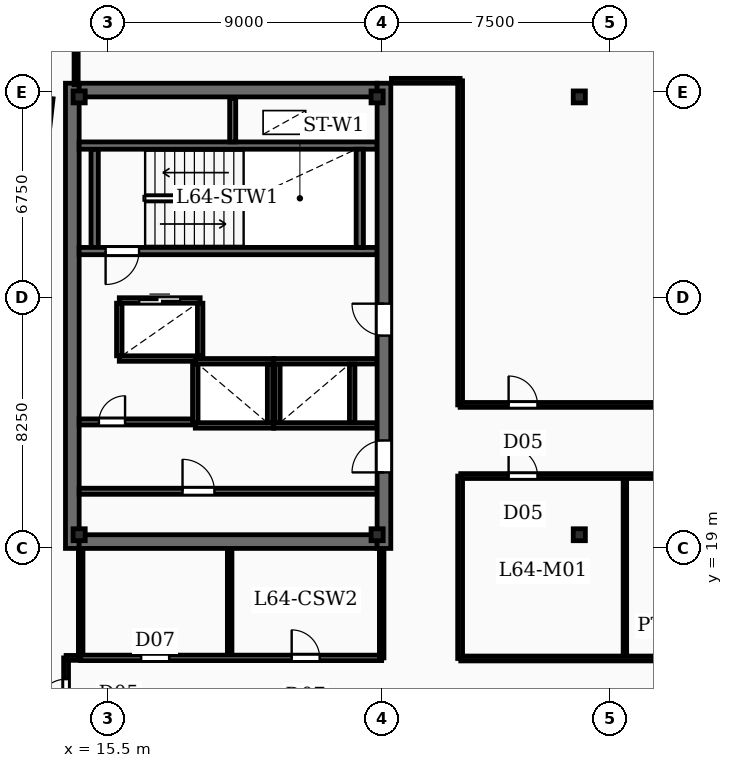
"""IFC4 building model, lengths in metres.
Left out: names, types, materials, properties, quantities, classifications, styles, units other than length and angle.
Written with IfcOpenShell. Run it as: python <this file> out.ifc"""

import sys

from ifc_helpers import new_model, si_unit, direction, frame, frame_2d, origin, origin_2d, place, context, subcontext, project, spatial, rectangle, i_section, extrude, element, fill, save


model = new_model("IFC4")
c1 = context("Model", 3, precision=1e-05, world=origin(), true_north=direction((0.0, 1.0)))
c2 = subcontext(c1, "Body", "Model", "MODEL_VIEW")
j1 = project(units=[si_unit("LENGTHUNIT", "METRE"), si_unit("PLANEANGLEUNIT", "RADIAN")], contexts=[c1])
p1 = place(None, origin())
s1 = spatial("IfcSite", under=j1, at=p1, CompositionType="ELEMENT")
p2 = place(p1, origin())
s2 = spatial("IfcBuilding", under=s1, at=p2, CompositionType="ELEMENT")
p3 = place(p2, frame((0.0, 0.0, 262.2)))
s3 = spatial("IfcBuildingStorey", under=s2, at=p3, CompositionType="ELEMENT", Elevation=262.2)
p4 = place(p3, frame((14.325, 19.0, -0.27), z_axis=(0.0, 0.0, 1.0), x_axis=(0.0, 1.0, 0.0)))
e1 = element("IfcWall", 1, at=p4, inside=s3, PredefinedType="SHEAR", context=c2, shape_type="SweptSolid", body=[
    extrude(rectangle(XDim=15.3, YDim=0.45, at=frame_2d((7.65, 0.0))), origin(), (0.0, 0.0, 1.0), 3.75),
])
p5 = place(p3, frame((24.575, 19.0, -0.27), z_axis=(0.0, 0.0, 1.0), x_axis=(0.0, 1.0, 0.0)))
e2 = element("IfcWall", 2, at=p5, inside=s3, PredefinedType="SHEAR", context=c2, shape_type="SweptSolid", body=[
    extrude(rectangle(XDim=15.3, YDim=0.45, at=frame_2d((7.65, 0.0))), origin(), (0.0, 0.0, 1.0), 3.75),
])
p6 = place(p5, frame((2.5, 0.0, 0.27)))
e3 = element("IfcOpeningElement", 3, at=p6, cuts=e2, PredefinedType="OPENING", context=c2, shape_type="SweptSolid", body=[
    extrude(rectangle(XDim=1.05, YDim=2.15, at=frame_2d((0.525, 1.075))), frame((0.0, 0.235, 0.0), z_axis=(0.0, -1.0, 0.0), x_axis=(1.0, 0.0, 0.0)), (0.0, 0.0, 1.0), 0.47),
])
p7 = place(p5, frame((7.0, 0.0, 0.27)))
e4 = element("IfcOpeningElement", 4, at=p7, cuts=e2, PredefinedType="OPENING", context=c2, shape_type="SweptSolid", body=[
    extrude(rectangle(XDim=1.05, YDim=2.15, at=frame_2d((0.525, 1.075))), frame((0.0, 0.235, 0.0), z_axis=(0.0, -1.0, 0.0), x_axis=(1.0, 0.0, 0.0)), (0.0, 0.0, 1.0), 0.47),
])
for number, where, z_axis, x_axis in (
    (5, (14.55, 19.225, -0.27), (0.0, 0.0, 1.0), (1.0, 0.0, 0.0)),
    (6, (14.55, 34.075, -0.27), (0.0, 0.0, 1.0), (1.0, 0.0, 0.0)),
):
    element("IfcWall", number, at=place(p3, frame(where, z_axis=z_axis, x_axis=x_axis)), inside=s3, PredefinedType="SHEAR", context=c2, shape_type="SweptSolid", body=[
        extrude(rectangle(XDim=9.8, YDim=0.45, at=frame_2d((4.9, 0.0))), origin(), (0.0, 0.0, 1.0), 3.75),
    ])
for number, where, z_axis, x_axis in (
    (7, (14.55, 19.45, -0.27), (0.0, 0.0, 1.0), (1.0, 0.0, 0.0)),
    (8, (24.35, 19.45, -0.27), (0.0, 0.0, 1.0), (1.0, 0.0, 0.0)),
    (9, (14.55, 33.85, -0.27), (0.0, 0.0, 1.0), (1.0, 0.0, 0.0)),
    (10, (24.35, 33.85, -0.27), (0.0, 0.0, 1.0), (1.0, 0.0, 0.0)),
    (11, (31.0, 19.45, -0.27), (0.0, 0.0, 1.0), (1.0, 0.0, 0.0)),
    (12, (31.0, 33.85, -0.27), (0.0, 0.0, 1.0), (1.0, 0.0, 0.0)),
):
    element("IfcColumn", number, at=place(p3, frame(where, z_axis=z_axis, x_axis=x_axis)), inside=s3, PredefinedType="COLUMN", context=c2, shape_type="SweptSolid", body=[
        extrude(i_section(OverallWidth=0.399, OverallDepth=0.393, WebThickness=0.023, FlangeThickness=0.037, FilletRadius=0.02, at=origin_2d()), origin(), (0.0, 0.0, 1.0), 3.75),
    ])
p8 = place(p3, frame((13.269, 33.384, -0.27), z_axis=(0.0, 0.0, 1.0), x_axis=(0.113203213768, 0.993571855677, 0.0)))
e13 = element("IfcColumn", 13, at=p8, inside=s3, PredefinedType="COLUMN", context=c2, shape_type="SweptSolid", body=[
    extrude(rectangle(XDim=0.9, YDim=0.75, at=origin_2d()), origin(), (0.0, 0.0, 1.0), 3.75),
])
p9 = place(p3, frame((10.211, 10.701, 0.0), z_axis=(0.0, 0.0, 1.0), x_axis=(0.113203107947, 0.993571867733, 0.0)))
e14 = element("IfcWall", 14, at=p9, inside=s3, PredefinedType="SOLIDWALL", context=c2, shape_type="SweptSolid", body=[
    extrude(rectangle(XDim=34.5, YDim=0.36, at=frame_2d((17.25, 0.0))), origin(), (0.0, 0.0, 1.0), 3.48),
])
p10 = place(p9, frame((4.2, 0.0, 0.88)))
e15 = element("IfcOpeningElement", 15, at=p10, cuts=e14, PredefinedType="OPENING", context=c2, shape_type="SweptSolid", body=[
    extrude(rectangle(XDim=1.35, YDim=2.2, at=frame_2d((0.675, 1.1))), frame((0.0, 0.19, 0.0), z_axis=(0.0, -1.0, 0.0), x_axis=(1.0, 0.0, 0.0)), (0.0, 0.0, 1.0), 0.38),
])
p11 = place(p9, frame((15.4, 0.0, 0.88)))
e16 = element("IfcOpeningElement", 16, at=p11, cuts=e14, PredefinedType="OPENING", context=c2, shape_type="SweptSolid", body=[
    extrude(rectangle(XDim=1.35, YDim=2.2, at=frame_2d((0.675, 1.1))), frame((0.0, 0.19, 0.0), z_axis=(0.0, -1.0, 0.0), x_axis=(1.0, 0.0, 0.0)), (0.0, 0.0, 1.0), 0.38),
])
p12 = place(p9, frame((26.6, 0.0, 0.88)))
e17 = element("IfcOpeningElement", 17, at=p12, cuts=e14, PredefinedType="OPENING", context=c2, shape_type="SweptSolid", body=[
    extrude(rectangle(XDim=1.35, YDim=2.2, at=frame_2d((0.675, 1.1))), frame((0.0, 0.19, 0.0), z_axis=(0.0, -1.0, 0.0), x_axis=(1.0, 0.0, 0.0)), (0.0, 0.0, 1.0), 0.38),
])
p13 = place(p3, frame((24.35, 28.78, 0.0), z_axis=(0.0, 0.0, 1.0), x_axis=(-1.0, 0.0, 0.0)))
e18 = element("IfcWall", 18, at=p13, inside=s3, PredefinedType="SOLIDWALL", context=c2, shape_type="SweptSolid", body=[
    extrude(rectangle(XDim=9.8, YDim=0.24, at=frame_2d((4.9, 0.0))), origin(), (0.0, 0.0, 1.0), 3.48),
])
p14 = place(p13, frame((7.83, 0.0, 0.0)))
e19 = element("IfcOpeningElement", 19, at=p14, cuts=e18, PredefinedType="OPENING", context=c2, shape_type="SweptSolid", body=[
    extrude(rectangle(XDim=1.1, YDim=2.15, at=frame_2d((0.55, 1.075))), frame((0.0, 0.13, 0.0), z_axis=(0.0, -1.0, 0.0), x_axis=(1.0, 0.0, 0.0)), (0.0, 0.0, 1.0), 0.26),
])
p15 = place(p3, frame((14.55, 32.25, 0.0), z_axis=(0.0, 0.0, 1.0), x_axis=(1.0, 0.0, 0.0)))
e20 = element("IfcWall", 20, at=p15, inside=s3, PredefinedType="SOLIDWALL", context=c2, shape_type="SweptSolid", body=[
    extrude(rectangle(XDim=9.8, YDim=0.24, at=frame_2d((4.9, 0.0))), origin(), (0.0, 0.0, 1.0), 3.48),
])
for number, where, z_axis, x_axis in (
    (21, (15.06, 28.9, 0.0), (0.0, 0.0, 1.0), (0.0, 1.0, 0.0)),
    (22, (23.78, 28.9, 0.0), (0.0, 0.0, 1.0), (0.0, 1.0, 0.0)),
):
    element("IfcWall", number, at=place(p3, frame(where, z_axis=z_axis, x_axis=x_axis)), inside=s3, PredefinedType="SOLIDWALL", context=c2, shape_type="SweptSolid", body=[
        extrude(rectangle(XDim=3.23, YDim=0.24, at=frame_2d((1.615, 0.0))), origin(), (0.0, 0.0, 1.0), 3.48),
    ])
p16 = place(p3, frame((19.6, 32.37, 0.0), z_axis=(0.0, 0.0, 1.0), x_axis=(0.0, 1.0, 0.0)))
e23 = element("IfcWall", 23, at=p16, inside=s3, PredefinedType="SOLIDWALL", context=c2, shape_type="SweptSolid", body=[
    extrude(rectangle(XDim=1.43, YDim=0.2, at=frame_2d((0.715, 0.0))), origin(), (0.0, 0.0, 1.0), 3.48),
])
for number, where, z_axis, x_axis in (
    (24, (18.37, 25.155, 0.0), (0.0, 0.0, 1.0), (1.0, 0.0, 0.0)),
    (25, (18.37, 23.045, 0.0), (0.0, 0.0, 1.0), (1.0, 0.0, 0.0)),
):
    element("IfcWall", number, at=place(p3, frame(where, z_axis=z_axis, x_axis=x_axis)), inside=s3, PredefinedType="SOLIDWALL", context=c2, shape_type="SweptSolid", body=[
        extrude(rectangle(XDim=2.58, YDim=0.18, at=frame_2d((1.29, 0.0))), origin(), (0.0, 0.0, 1.0), 3.48),
    ])
for number, where, z_axis, x_axis in (
    (26, (18.37, 23.135, 0.0), (0.0, 0.0, 1.0), (0.0, 1.0, 0.0)),
    (27, (20.83, 23.135, 0.0), (0.0, 0.0, 1.0), (0.0, 1.0, 0.0)),
):
    element("IfcWall", number, at=place(p3, frame(where, z_axis=z_axis, x_axis=x_axis)), inside=s3, PredefinedType="SOLIDWALL", context=c2, shape_type="SweptSolid", body=[
        extrude(rectangle(XDim=1.93, YDim=0.18, at=frame_2d((0.965, 0.0))), origin(), (0.0, 0.0, 1.0), 3.48),
    ])
for number, where, z_axis, x_axis in (
    (28, (20.95, 25.155, 0.0), (0.0, 0.0, 1.0), (1.0, 0.0, 0.0)),
    (29, (20.95, 23.045, 0.0), (0.0, 0.0, 1.0), (1.0, 0.0, 0.0)),
):
    element("IfcWall", number, at=place(p3, frame(where, z_axis=z_axis, x_axis=x_axis)), inside=s3, PredefinedType="SOLIDWALL", context=c2, shape_type="SweptSolid", body=[
        extrude(rectangle(XDim=3.4, YDim=0.18, at=frame_2d((1.7, 0.0))), origin(), (0.0, 0.0, 1.0), 3.48),
    ])
for number, where, z_axis, x_axis in (
    (30, (21.07, 23.135, 0.0), (0.0, 0.0, 1.0), (0.0, 1.0, 0.0)),
    (31, (23.53, 23.135, 0.0), (0.0, 0.0, 1.0), (0.0, 1.0, 0.0)),
):
    element("IfcWall", number, at=place(p3, frame(where, z_axis=z_axis, x_axis=x_axis)), inside=s3, PredefinedType="SOLIDWALL", context=c2, shape_type="SweptSolid", body=[
        extrude(rectangle(XDim=1.93, YDim=0.18, at=frame_2d((0.965, 0.0))), origin(), (0.0, 0.0, 1.0), 3.48),
    ])
p17 = place(p3, frame((15.87, 27.155, 0.0), z_axis=(0.0, 0.0, 1.0), x_axis=(1.0, 0.0, 0.0)))
e32 = element("IfcWall", 32, at=p17, inside=s3, PredefinedType="SOLIDWALL", context=c2, shape_type="SweptSolid", body=[
    extrude(rectangle(XDim=2.66, YDim=0.18, at=frame_2d((1.33, 0.0))), origin(), (0.0, 0.0, 1.0), 3.48),
])
p18 = place(p17, frame((0.655, 0.0, 0.0)))
e33 = element("IfcOpeningElement", 33, at=p18, cuts=e32, PredefinedType="OPENING", context=c2, shape_type="SweptSolid", body=[
    extrude(rectangle(XDim=1.35, YDim=2.3, at=frame_2d((0.675, 1.15))), frame((0.0, 0.1, 0.0), z_axis=(0.0, -1.0, 0.0), x_axis=(1.0, 0.0, 0.0)), (0.0, 0.0, 1.0), 0.2),
])
p19 = place(p3, frame((15.87, 25.245, 0.0), z_axis=(0.0, 0.0, 1.0), x_axis=(1.0, 0.0, 0.0)))
e34 = element("IfcWall", 34, at=p19, inside=s3, PredefinedType="SOLIDWALL", context=c2, shape_type="SweptSolid", body=[
    extrude(rectangle(XDim=2.66, YDim=0.18, at=frame_2d((1.33, 0.0))), origin(), (0.0, 0.0, 1.0), 3.48),
])
for number, where, z_axis, x_axis in (
    (35, (15.87, 25.335, 0.0), (0.0, 0.0, 1.0), (0.0, 1.0, 0.0)),
    (36, (18.53, 25.335, 0.0), (0.0, 0.0, 1.0), (0.0, 1.0, 0.0)),
):
    element("IfcWall", number, at=place(p3, frame(where, z_axis=z_axis, x_axis=x_axis)), inside=s3, PredefinedType="SOLIDWALL", context=c2, shape_type="SweptSolid", body=[
        extrude(rectangle(XDim=1.73, YDim=0.18, at=frame_2d((0.865, 0.0))), origin(), (0.0, 0.0, 1.0), 3.48),
    ])
p20 = place(p3, frame((14.55, 20.88, 0.0), z_axis=(0.0, 0.0, 1.0), x_axis=(1.0, 0.0, 0.0)))
e37 = element("IfcWall", 37, at=p20, inside=s3, PredefinedType="SOLIDWALL", context=c2, shape_type="SweptSolid", body=[
    extrude(rectangle(XDim=9.8, YDim=0.2, at=frame_2d((4.9, 0.0))), origin(), (0.0, 0.0, 1.0), 2.54),
])
p21 = place(p20, frame((3.4, 0.0, 0.0)))
e38 = element("IfcOpeningElement", 38, at=p21, cuts=e37, PredefinedType="OPENING", context=c2, shape_type="SweptSolid", body=[
    extrude(rectangle(XDim=1.05, YDim=2.15, at=frame_2d((0.525, 1.075))), frame((0.0, 0.11, 0.0), z_axis=(0.0, -1.0, 0.0), x_axis=(1.0, 0.0, 0.0)), (0.0, 0.0, 1.0), 0.22),
])
p22 = place(p3, frame((14.55, 23.16, 0.0), z_axis=(0.0, 0.0, 1.0), x_axis=(1.0, 0.0, 0.0)))
e39 = element("IfcWall", 39, at=p22, inside=s3, PredefinedType="SOLIDWALL", context=c2, shape_type="SweptSolid", body=[
    extrude(rectangle(XDim=3.82, YDim=0.2, at=frame_2d((1.91, 0.0))), origin(), (0.0, 0.0, 1.0), 2.54),
])
p23 = place(p22, frame((0.65, 0.0, 0.0)))
e40 = element("IfcOpeningElement", 40, at=p23, cuts=e39, PredefinedType="OPENING", context=c2, shape_type="SweptSolid", body=[
    extrude(rectangle(XDim=0.86, YDim=2.05, at=frame_2d((0.43, 1.025))), frame((0.0, 0.11, 0.0), z_axis=(0.0, -1.0, 0.0), x_axis=(1.0, 0.0, 0.0)), (0.0, 0.0, 1.0), 0.22),
])
p24 = place(p3, frame((19.5, 15.4, 0.0), z_axis=(0.0, 0.0, 1.0), x_axis=(0.0, 1.0, 0.0)))
e41 = element("IfcWall", 41, at=p24, inside=s3, PredefinedType="PARTITIONING", context=c2, shape_type="SweptSolid", body=[
    extrude(rectangle(XDim=3.58, YDim=0.15, at=frame_2d((1.79, 0.0))), origin(), (0.0, 0.0, 1.0), 2.54),
])
p25 = place(p3, frame((14.6, 15.4, 0.0), z_axis=(0.0, 0.0, 1.0), x_axis=(1.0, 0.0, 0.0)))
e42 = element("IfcWall", 42, at=p25, inside=s3, PredefinedType="PARTITIONING", context=c2, shape_type="SweptSolid", body=[
    extrude(rectangle(XDim=9.9, YDim=0.18, at=frame_2d((4.95, 0.0))), origin(), (0.0, 0.0, 1.0), 2.54),
])
p26 = place(p25, frame((1.99, 0.0, 0.0)))
e43 = element("IfcOpeningElement", 43, at=p26, cuts=e42, PredefinedType="OPENING", context=c2, shape_type="SweptSolid", body=[
    extrude(rectangle(XDim=0.92, YDim=2.1, at=frame_2d((0.46, 1.05))), frame((0.0, 0.1, 0.0), z_axis=(0.0, -1.0, 0.0), x_axis=(1.0, 0.0, 0.0)), (0.0, 0.0, 1.0), 0.2),
])
p27 = place(p25, frame((6.94, 0.0, 0.0)))
e44 = element("IfcOpeningElement", 44, at=p27, cuts=e42, PredefinedType="OPENING", context=c2, shape_type="SweptSolid", body=[
    extrude(rectangle(XDim=0.92, YDim=2.1, at=frame_2d((0.46, 1.05))), frame((0.0, 0.1, 0.0), z_axis=(0.0, -1.0, 0.0), x_axis=(1.0, 0.0, 0.0)), (0.0, 0.0, 1.0), 0.2),
])
for number, where, z_axis, x_axis in (
    (45, (14.6, 15.4, 0.0), (0.0, 0.0, 1.0), (0.0, 1.0, 0.0)),
    (46, (24.5, 15.4, 0.0), (0.0, 0.0, 1.0), (0.0, 1.0, 0.0)),
):
    element("IfcWall", number, at=place(p3, frame(where, z_axis=z_axis, x_axis=x_axis)), inside=s3, PredefinedType="PARTITIONING", context=c2, shape_type="SweptSolid", body=[
        extrude(rectangle(XDim=3.58, YDim=0.15, at=frame_2d((1.79, 0.0))), origin(), (0.0, 0.0, 1.0), 2.54),
    ])
p28 = place(p3, frame((14.45, 34.25, 0.0), z_axis=(0.0, 0.0, 1.0), x_axis=(0.0, 1.0, 0.0)))
e47 = element("IfcWall", 47, at=p28, inside=s3, PredefinedType="PARTITIONING", context=c2, shape_type="SweptSolid", body=[
    extrude(rectangle(XDim=11.562, YDim=0.135, at=frame_2d((5.781, 0.0))), origin(), (0.0, 0.0, 1.0), 2.54),
])
p29 = place(p3, frame((27.08, 23.72, 0.0), z_axis=(0.0, 0.0, 1.0), x_axis=(1.0, 0.0, 0.0)))
e48 = element("IfcWall", 48, at=p29, inside=s3, PredefinedType="PARTITIONING", context=c2, shape_type="SweptSolid", body=[
    extrude(rectangle(XDim=20.74, YDim=0.16, at=frame_2d((10.37, 0.0))), origin(), (0.0, 0.0, 1.0), 2.54),
])
p30 = place(p29, frame((1.595, 0.0, 0.0)))
e49 = element("IfcOpeningElement", 49, at=p30, cuts=e48, PredefinedType="OPENING", context=c2, shape_type="SweptSolid", body=[
    extrude(rectangle(XDim=0.95, YDim=2.15, at=frame_2d((0.475, 1.075))), frame((0.0, 0.09, 0.0), z_axis=(0.0, -1.0, 0.0), x_axis=(1.0, 0.0, 0.0)), (0.0, 0.0, 1.0), 0.18),
])
p31 = place(p29, frame((14.595, 0.0, 0.0)))
e50 = element("IfcOpeningElement", 50, at=p31, cuts=e48, PredefinedType="OPENING", context=c2, shape_type="SweptSolid", body=[
    extrude(rectangle(XDim=0.95, YDim=2.15, at=frame_2d((0.475, 1.075))), frame((0.0, 0.09, 0.0), z_axis=(0.0, -1.0, 0.0), x_axis=(1.0, 0.0, 0.0)), (0.0, 0.0, 1.0), 0.18),
])
p32 = place(p3, frame((27.08, 23.72, 0.0), z_axis=(0.0, 0.0, 1.0), x_axis=(0.0, 1.0, 0.0)))
e51 = element("IfcWall", 51, at=p32, inside=s3, PredefinedType="PARTITIONING", context=c2, shape_type="SweptSolid", body=[
    extrude(rectangle(XDim=10.66, YDim=0.16, at=frame_2d((5.33, 0.0))), origin(), (0.0, 0.0, 1.0), 2.54),
])
p33 = place(p3, frame((24.82, 34.38, 0.0), z_axis=(0.0, 0.0, 1.0), x_axis=(1.0, 0.0, 0.0)))
e52 = element("IfcWall", 52, at=p33, inside=s3, PredefinedType="PARTITIONING", context=c2, shape_type="SweptSolid", body=[
    extrude(rectangle(XDim=2.26, YDim=0.16, at=frame_2d((1.13, 0.0))), origin(), (0.0, 0.0, 1.0), 2.54),
])
p34 = place(p3, frame((32.5, 15.38, 0.0), z_axis=(0.0, 0.0, 1.0), x_axis=(0.0, 1.0, 0.0)))
e53 = element("IfcWall", 53, at=p34, inside=s3, PredefinedType="PARTITIONING", context=c2, shape_type="SweptSolid", body=[
    extrude(rectangle(XDim=6.0, YDim=0.115, at=frame_2d((3.0, 0.0))), origin(), (0.0, 0.0, 1.0), 2.54),
])
p35 = place(p3, frame((27.1, 21.38, 0.0), z_axis=(0.0, 0.0, 1.0), x_axis=(1.0, 0.0, 0.0)))
e54 = element("IfcWall", 54, at=p35, inside=s3, PredefinedType="PARTITIONING", context=c2, shape_type="SweptSolid", body=[
    extrude(rectangle(XDim=12.46, YDim=0.16, at=frame_2d((6.23, 0.0))), origin(), (0.0, 0.0, 1.0), 2.54),
])
p36 = place(p35, frame((1.575, 0.0, 0.0)))
e55 = element("IfcOpeningElement", 55, at=p36, cuts=e54, PredefinedType="OPENING", context=c2, shape_type="SweptSolid", body=[
    extrude(rectangle(XDim=0.95, YDim=2.15, at=frame_2d((0.475, 1.075))), frame((0.0, 0.09, 0.0), z_axis=(0.0, -1.0, 0.0), x_axis=(1.0, 0.0, 0.0)), (0.0, 0.0, 1.0), 0.18),
])
p37 = place(p35, frame((8.455, 0.0, 0.0)))
e56 = element("IfcOpeningElement", 56, at=p37, cuts=e54, PredefinedType="OPENING", context=c2, shape_type="SweptSolid", body=[
    extrude(rectangle(XDim=0.95, YDim=2.15, at=frame_2d((0.475, 1.075))), frame((0.0, 0.09, 0.0), z_axis=(0.0, -1.0, 0.0), x_axis=(1.0, 0.0, 0.0)), (0.0, 0.0, 1.0), 0.18),
])
p38 = place(p3, frame((27.1, 15.38, 0.0), z_axis=(0.0, 0.0, 1.0), x_axis=(1.0, 0.0, 0.0)))
e57 = element("IfcWall", 57, at=p38, inside=s3, PredefinedType="PARTITIONING", context=c2, shape_type="SweptSolid", body=[
    extrude(rectangle(XDim=12.46, YDim=0.16, at=frame_2d((6.23, 0.0))), origin(), (0.0, 0.0, 1.0), 2.54),
])
p39 = place(p3, frame((27.08, 15.38, 0.0), z_axis=(0.0, 0.0, 1.0), x_axis=(0.0, 1.0, 0.0)))
e58 = element("IfcWall", 58, at=p39, inside=s3, PredefinedType="PARTITIONING", context=c2, shape_type="SweptSolid", body=[
    extrude(rectangle(XDim=6.0, YDim=0.16, at=frame_2d((3.0, 0.0))), origin(), (0.0, 0.0, 1.0), 2.54),
])
p40 = place(p3, frame((14.12, 13.1, 0.0), z_axis=(0.0, 0.0, 1.0), x_axis=(0.0, 1.0, 0.0)))
e59 = element("IfcWall", 59, at=p40, inside=s3, PredefinedType="PARTITIONING", context=c2, shape_type="SweptSolid", body=[
    extrude(rectangle(XDim=2.3, YDim=0.16, at=frame_2d((1.15, 0.0))), origin(), (0.0, 0.0, 1.0), 2.54),
])
p41 = place(p40, frame((0.65, 0.0, 0.0)))
e60 = element("IfcOpeningElement", 60, at=p41, cuts=e59, PredefinedType="OPENING", context=c2, shape_type="SweptSolid", body=[
    extrude(rectangle(XDim=0.95, YDim=2.15, at=frame_2d((0.475, 1.075))), frame((0.0, 0.09, 0.0), z_axis=(0.0, -1.0, 0.0), x_axis=(1.0, 0.0, 0.0)), (0.0, 0.0, 1.0), 0.18),
])
p42 = place(p3, frame((14.12, 15.4, 0.0), z_axis=(0.0, 0.0, 1.0), x_axis=(1.0, 0.0, 0.0)))
e61 = element("IfcWall", 61, at=p42, inside=s3, PredefinedType="PARTITIONING", context=c2, shape_type="SweptSolid", body=[
    extrude(rectangle(XDim=0.5, YDim=0.16, at=frame_2d((0.25, 0.0))), origin(), (0.0, 0.0, 1.0), 2.54),
])
p43 = place(p6, origin())
e62 = element("IfcDoor", 62, at=p43, inside=s3, OperationType="SINGLE_SWING_LEFT", PredefinedType="DOOR", context=c2, shape_type="SweptSolid", body=[
    extrude(rectangle(XDim=1.05, YDim=2.15, at=frame_2d((0.525, 1.075))), frame((0.0, 0.025, 0.0), z_axis=(0.0, -1.0, 0.0), x_axis=(1.0, 0.0, 0.0)), (0.0, 0.0, 1.0), 0.05),
])
fill(e3, e62)
p44 = place(p7, origin())
e63 = element("IfcDoor", 63, at=p44, inside=s3, OperationType="SINGLE_SWING_RIGHT", PredefinedType="DOOR", context=c2, shape_type="SweptSolid", body=[
    extrude(rectangle(XDim=1.05, YDim=2.15, at=frame_2d((0.525, 1.075))), frame((0.0, 0.025, 0.0), z_axis=(0.0, -1.0, 0.0), x_axis=(1.0, 0.0, 0.0)), (0.0, 0.0, 1.0), 0.05),
])
fill(e4, e63)
p45 = place(p14, origin())
e64 = element("IfcDoor", 64, at=p45, inside=s3, OperationType="SINGLE_SWING_RIGHT", PredefinedType="DOOR", context=c2, shape_type="SweptSolid", body=[
    extrude(rectangle(XDim=1.1, YDim=2.15, at=frame_2d((0.55, 1.075))), frame((0.0, 0.025, 0.0), z_axis=(0.0, -1.0, 0.0), x_axis=(1.0, 0.0, 0.0)), (0.0, 0.0, 1.0), 0.05),
])
fill(e19, e64)
p46 = place(p18, origin())
e65 = element("IfcDoor", 65, at=p46, inside=s3, OperationType="DOUBLE_DOOR_SLIDING", PredefinedType="DOOR", context=c2, shape_type="SweptSolid", body=[
    extrude(rectangle(XDim=1.35, YDim=2.3, at=frame_2d((0.675, 1.15))), frame((0.0, 0.025, 0.0), z_axis=(0.0, -1.0, 0.0), x_axis=(1.0, 0.0, 0.0)), (0.0, 0.0, 1.0), 0.05),
])
fill(e33, e65)
p47 = place(p21, origin())
e66 = element("IfcDoor", 66, at=p47, inside=s3, OperationType="SINGLE_SWING_LEFT", PredefinedType="DOOR", context=c2, shape_type="SweptSolid", body=[
    extrude(rectangle(XDim=1.05, YDim=2.15, at=frame_2d((0.525, 1.075))), frame((0.0, 0.025, 0.0), z_axis=(0.0, -1.0, 0.0), x_axis=(1.0, 0.0, 0.0)), (0.0, 0.0, 1.0), 0.05),
])
fill(e38, e66)
p48 = place(p23, origin())
e67 = element("IfcDoor", 67, at=p48, inside=s3, OperationType="SINGLE_SWING_RIGHT", PredefinedType="DOOR", context=c2, shape_type="SweptSolid", body=[
    extrude(rectangle(XDim=0.86, YDim=2.05, at=frame_2d((0.43, 1.025))), frame((0.0, 0.025, 0.0), z_axis=(0.0, -1.0, 0.0), x_axis=(1.0, 0.0, 0.0)), (0.0, 0.0, 1.0), 0.05),
])
fill(e40, e67)
p49 = place(p26, origin())
e68 = element("IfcDoor", 68, at=p49, inside=s3, OperationType="SINGLE_SWING_RIGHT", PredefinedType="DOOR", context=c2, shape_type="SweptSolid", body=[
    extrude(rectangle(XDim=0.92, YDim=2.1, at=frame_2d((0.46, 1.05))), frame((0.0, 0.025, 0.0), z_axis=(0.0, -1.0, 0.0), x_axis=(1.0, 0.0, 0.0)), (0.0, 0.0, 1.0), 0.05),
])
fill(e43, e68)
p50 = place(p27, origin())
e69 = element("IfcDoor", 69, at=p50, inside=s3, OperationType="SINGLE_SWING_LEFT", PredefinedType="DOOR", context=c2, shape_type="SweptSolid", body=[
    extrude(rectangle(XDim=0.92, YDim=2.1, at=frame_2d((0.46, 1.05))), frame((0.0, 0.025, 0.0), z_axis=(0.0, -1.0, 0.0), x_axis=(1.0, 0.0, 0.0)), (0.0, 0.0, 1.0), 0.05),
])
fill(e44, e69)
p51 = place(p30, origin())
e70 = element("IfcDoor", 70, at=p51, inside=s3, OperationType="SINGLE_SWING_LEFT", PredefinedType="DOOR", context=c2, shape_type="SweptSolid", body=[
    extrude(rectangle(XDim=0.95, YDim=2.15, at=frame_2d((0.475, 1.075))), frame((0.0, 0.025, 0.0), z_axis=(0.0, -1.0, 0.0), x_axis=(1.0, 0.0, 0.0)), (0.0, 0.0, 1.0), 0.05),
])
fill(e49, e70)
p52 = place(p36, origin())
e71 = element("IfcDoor", 71, at=p52, inside=s3, OperationType="SINGLE_SWING_LEFT", PredefinedType="DOOR", context=c2, shape_type="SweptSolid", body=[
    extrude(rectangle(XDim=0.95, YDim=2.15, at=frame_2d((0.475, 1.075))), frame((0.0, 0.025, 0.0), z_axis=(0.0, -1.0, 0.0), x_axis=(1.0, 0.0, 0.0)), (0.0, 0.0, 1.0), 0.05),
])
fill(e55, e71)
p53 = place(p41, origin())
e72 = element("IfcDoor", 72, at=p53, inside=s3, OperationType="SINGLE_SWING_LEFT", PredefinedType="DOOR", context=c2, shape_type="SweptSolid", body=[
    extrude(rectangle(XDim=0.95, YDim=2.15, at=frame_2d((0.475, 1.075))), frame((0.0, 0.025, 0.0), z_axis=(0.0, -1.0, 0.0), x_axis=(1.0, 0.0, 0.0)), (0.0, 0.0, 1.0), 0.05),
])
fill(e60, e72)
save(model, sys.argv[1])
